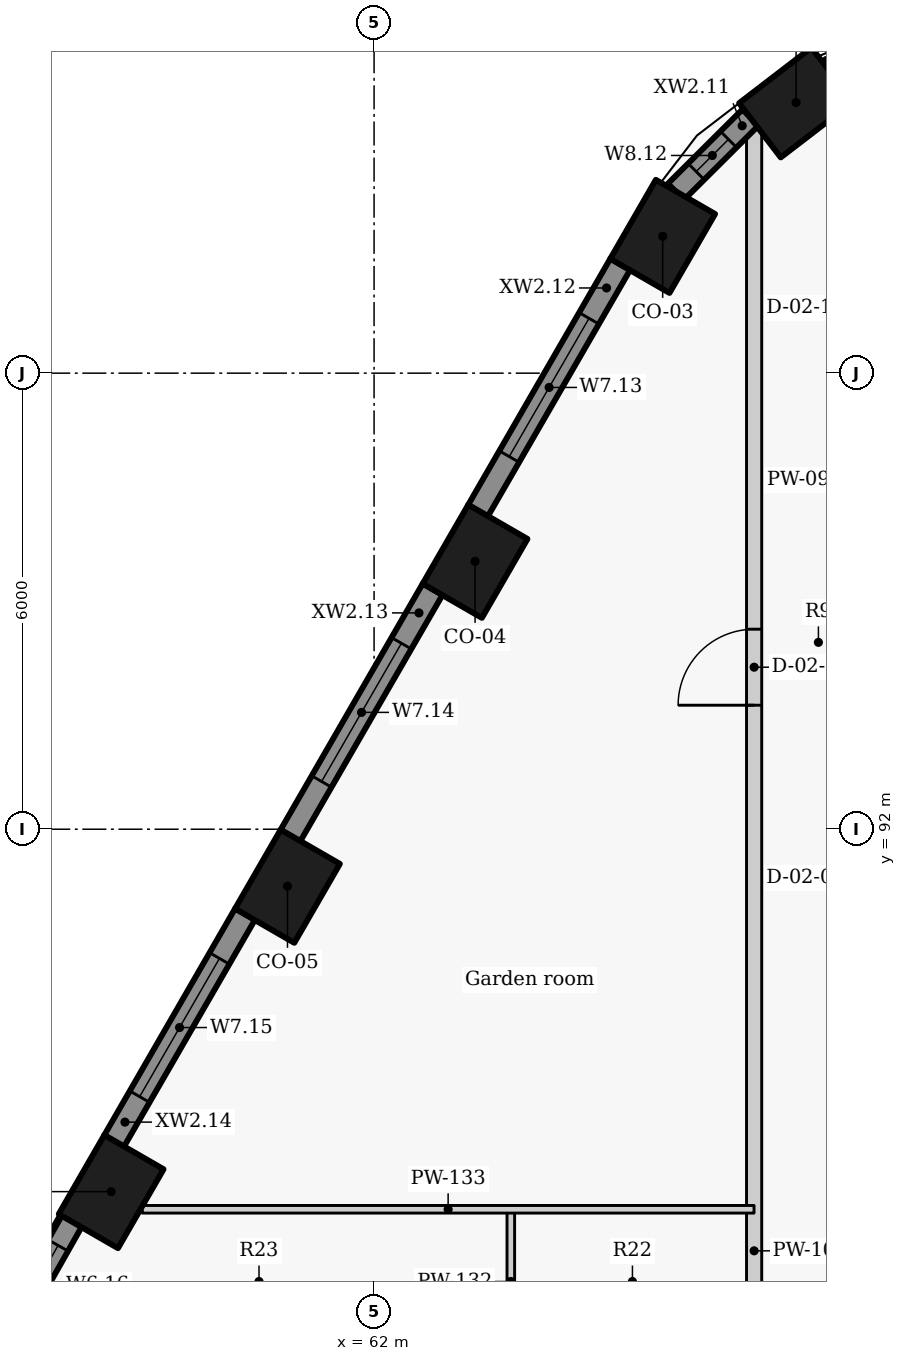
"""IFC4 building model, lengths in metres.
Left out: names, types, materials, properties, quantities, classifications, styles, units other than length and angle.
Written with IfcOpenShell. Run it as: python <this file> out.ifc"""

import sys

from ifc_helpers import new_model, si_unit, direction, frame, frame_2d, origin, origin_2d, place, context, subcontext, project, spatial, rectangle, extrude, element, fill, save


model = new_model("IFC4")
c1 = context("Model", 3, precision=1e-05, world=origin(), true_north=direction((0.0, 1.0)))
c2 = subcontext(c1, "Body", "Model", "MODEL_VIEW")
j1 = project(units=[si_unit("LENGTHUNIT", "METRE"), si_unit("PLANEANGLEUNIT", "RADIAN")], contexts=[c1])
p1 = place(None, origin())
s1 = spatial("IfcSite", under=j1, at=p1, CompositionType="ELEMENT")
p2 = place(p1, origin())
s2 = spatial("IfcBuilding", under=s1, at=p2, CompositionType="ELEMENT")
p3 = place(p2, frame((0.0, 0.0, 213.0)))
s3 = spatial("IfcBuildingStorey", under=s2, at=p3, CompositionType="ELEMENT", Elevation=213.0)
for number, where, z_axis, x_axis in (
    (1, (67.552, 101.56, 0.0), (0.0, 0.0, 1.0), (-0.793, -0.609, 0.0)),
    (2, (65.797, 99.8, 0.0), (0.0, 0.0, 1.0), (-0.5, -0.866, 0.0)),
    (3, (63.329, 95.525, 0.0), (0.0, 0.0, 1.0), (-0.5, -0.866, 0.0)),
    (4, (60.861, 91.25, 0.0), (0.0, 0.0, 1.0), (-0.5, -0.866, 0.0)),
    (5, (58.541, 87.232, 0.0), (0.0, 0.0, 1.0), (-0.5, -0.866, 0.0)),
):
    element("IfcColumn", number, at=place(p3, frame(where, z_axis=z_axis, x_axis=x_axis)), inside=s3, PredefinedType="COLUMN", context=c2, shape_type="SweptSolid", body=[
        extrude(rectangle(XDim=1.2, YDim=0.9, at=origin_2d()), origin(), (0.0, 0.0, 1.0), 3.3),
    ])
p4 = place(p3, frame((69.336, 102.333, 0.0), z_axis=(0.0, 0.0, 1.0), x_axis=(-0.969037396898, -0.246914000036, 0.0)))
e6 = element("IfcWall", 6, at=p4, inside=s3, PredefinedType="SOLIDWALL", context=c2, shape_type="SweptSolid", body=[
    extrude(rectangle(XDim=1.403, YDim=0.3, at=frame_2d((0.702, 0.0))), origin(), (0.0, 0.0, 1.0), 2.425),
])
p5 = place(p4, frame((0.229, 0.0, 0.9)))
e7 = element("IfcOpeningElement", 7, at=p5, cuts=e6, PredefinedType="OPENING", context=c2, shape_type="SweptSolid", body=[
    extrude(rectangle(XDim=0.6, YDim=1.1, at=frame_2d((0.3, 0.55))), frame((0.0, 0.16, 0.0), z_axis=(0.0, -1.0, 0.0), x_axis=(1.0, 0.0, 0.0)), (0.0, 0.0, 1.0), 0.32),
])
p6 = place(p3, frame((66.952, 101.363, 0.0), z_axis=(0.0, 0.0, 1.0), x_axis=(-0.70869320446, -0.705516790695, 0.0)))
e8 = element("IfcWall", 8, at=p6, inside=s3, PredefinedType="SOLIDWALL", context=c2, shape_type="SweptSolid", body=[
    extrude(rectangle(XDim=1.384, YDim=0.3, at=frame_2d((0.692, 0.0))), origin(), (0.0, 0.0, 1.0), 2.425),
])
p7 = place(p6, frame((0.408, 0.0, 0.9)))
e9 = element("IfcOpeningElement", 9, at=p7, cuts=e8, PredefinedType="OPENING", context=c2, shape_type="SweptSolid", body=[
    extrude(rectangle(XDim=0.6, YDim=1.1, at=frame_2d((0.3, 0.55))), frame((0.0, 0.16, 0.0), z_axis=(0.0, -1.0, 0.0), x_axis=(1.0, 0.0, 0.0)), (0.0, 0.0, 1.0), 0.32),
])
p8 = place(p3, frame((65.239, 99.433, 0.0), z_axis=(0.0, 0.0, 1.0), x_axis=(-0.499982088007, -0.866035745032, 0.0)))
e10 = element("IfcWall", 10, at=p8, inside=s3, PredefinedType="SOLIDWALL", context=c2, shape_type="SweptSolid", body=[
    extrude(rectangle(XDim=3.744, YDim=0.3, at=frame_2d((1.872, 0.0))), origin(), (0.0, 0.0, 1.0), 2.425),
])
p9 = place(p8, frame((0.822, 0.0, 0.9)))
e11 = element("IfcOpeningElement", 11, at=p9, cuts=e10, PredefinedType="OPENING", context=c2, shape_type="SweptSolid", body=[
    extrude(rectangle(XDim=2.1, YDim=1.1, at=frame_2d((1.05, 0.55))), frame((0.0, 0.16, 0.0), z_axis=(0.0, -1.0, 0.0), x_axis=(1.0, 0.0, 0.0)), (0.0, 0.0, 1.0), 0.32),
])
p10 = place(p3, frame((62.771, 95.158, 0.0), z_axis=(0.0, 0.0, 1.0), x_axis=(-0.500059225181, -0.86599120741, 0.0)))
e12 = element("IfcWall", 12, at=p10, inside=s3, PredefinedType="SOLIDWALL", context=c2, shape_type="SweptSolid", body=[
    extrude(rectangle(XDim=3.744, YDim=0.3, at=frame_2d((1.872, 0.0))), origin(), (0.0, 0.0, 1.0), 2.425),
])
p11 = place(p10, frame((0.822, 0.0, 0.9)))
e13 = element("IfcOpeningElement", 13, at=p11, cuts=e12, PredefinedType="OPENING", context=c2, shape_type="SweptSolid", body=[
    extrude(rectangle(XDim=2.1, YDim=1.1, at=frame_2d((1.05, 0.55))), frame((0.0, 0.16, 0.0), z_axis=(0.0, -1.0, 0.0), x_axis=(1.0, 0.0, 0.0)), (0.0, 0.0, 1.0), 0.32),
])
p12 = place(p3, frame((60.303, 90.884, 0.0), z_axis=(0.0, 0.0, 1.0), x_axis=(-0.499955427682, -0.866051136095, 0.0)))
e14 = element("IfcWall", 14, at=p12, inside=s3, PredefinedType="SOLIDWALL", context=c2, shape_type="SweptSolid", body=[
    extrude(rectangle(XDim=3.447, YDim=0.3, at=frame_2d((1.724, 0.0))), origin(), (0.0, 0.0, 1.0), 2.425),
])
p13 = place(p12, frame((0.674, 0.0, 0.9)))
e15 = element("IfcOpeningElement", 15, at=p13, cuts=e14, PredefinedType="OPENING", context=c2, shape_type="SweptSolid", body=[
    extrude(rectangle(XDim=2.1, YDim=1.1, at=frame_2d((1.05, 0.55))), frame((0.0, 0.16, 0.0), z_axis=(0.0, -1.0, 0.0), x_axis=(1.0, 0.0, 0.0)), (0.0, 0.0, 1.0), 0.32),
])
p14 = place(p3, frame((58.023, 86.843, 0.0), z_axis=(0.0, 0.0, 1.0), x_axis=(-0.492033360928, -0.870576344575, 0.0)))
e16 = element("IfcWall", 16, at=p14, inside=s3, PredefinedType="SOLIDWALL", context=c2, shape_type="SweptSolid", body=[
    extrude(rectangle(XDim=5.387, YDim=0.3, at=frame_2d((2.693, 0.0))), origin(), (0.0, 0.0, 1.0), 2.425),
])
p15 = place(p14, frame((0.366, 0.0, 0.9)))
e17 = element("IfcOpeningElement", 17, at=p15, cuts=e16, PredefinedType="OPENING", context=c2, shape_type="SweptSolid", body=[
    extrude(rectangle(XDim=1.2, YDim=1.1, at=frame_2d((0.6, 0.55))), frame((0.0, 0.16, 0.0), z_axis=(0.0, -1.0, 0.0), x_axis=(1.0, 0.0, 0.0)), (0.0, 0.0, 1.0), 0.32),
])
p16 = place(p14, frame((2.321, 0.0, 0.9)))
e18 = element("IfcOpeningElement", 18, at=p16, cuts=e16, PredefinedType="OPENING", context=c2, shape_type="SweptSolid", body=[
    extrude(rectangle(XDim=2.1, YDim=1.1, at=frame_2d((1.05, 0.55))), frame((0.0, 0.16, 0.0), z_axis=(0.0, -1.0, 0.0), x_axis=(1.0, 0.0, 0.0)), (0.0, 0.0, 1.0), 0.32),
])
p17 = place(p3, frame((67.0, 58.674, 0.0), z_axis=(0.0, 0.0, 1.0), x_axis=(0.0, 1.0, 0.0)))
e19 = element("IfcWall", 19, at=p17, inside=s3, PredefinedType="PARTITIONING", context=c2, shape_type="SweptSolid", body=[
    extrude(rectangle(XDim=42.592, YDim=0.2, at=frame_2d((21.296, 0.0))), origin(), (0.0, 0.0, 1.0), 2.405),
])
p18 = place(p17, frame((18.026, 0.0, 0.0)))
e20 = element("IfcOpeningElement", 20, at=p18, cuts=e19, PredefinedType="OPENING", context=c2, shape_type="SweptSolid", body=[
    extrude(rectangle(XDim=1.0, YDim=2.1, at=frame_2d((0.5, 1.05))), frame((0.0, 0.11, 0.0), z_axis=(0.0, -1.0, 0.0), x_axis=(1.0, 0.0, 0.0)), (0.0, 0.0, 1.0), 0.22),
])
p19 = place(p17, frame((19.601, 0.0, 0.0)))
e21 = element("IfcOpeningElement", 21, at=p19, cuts=e19, PredefinedType="OPENING", context=c2, shape_type="SweptSolid", body=[
    extrude(rectangle(XDim=1.0, YDim=2.1, at=frame_2d((0.5, 1.05))), frame((0.0, 0.11, 0.0), z_axis=(0.0, -1.0, 0.0), x_axis=(1.0, 0.0, 0.0)), (0.0, 0.0, 1.0), 0.22),
])
p20 = place(p17, frame((4.332, 0.0, 0.0)))
e22 = element("IfcOpeningElement", 22, at=p20, cuts=e19, PredefinedType="OPENING", context=c2, shape_type="SweptSolid", body=[
    extrude(rectangle(XDim=1.0, YDim=2.1, at=frame_2d((0.5, 1.05))), frame((0.0, 0.11, 0.0), z_axis=(0.0, -1.0, 0.0), x_axis=(1.0, 0.0, 0.0)), (0.0, 0.0, 1.0), 0.22),
])
p21 = place(p17, frame((34.957, 0.0, 0.0)))
e23 = element("IfcOpeningElement", 23, at=p21, cuts=e19, PredefinedType="OPENING", context=c2, shape_type="SweptSolid", body=[
    extrude(rectangle(XDim=1.0, YDim=2.1, at=frame_2d((0.5, 1.05))), frame((0.0, 0.11, 0.0), z_axis=(0.0, -1.0, 0.0), x_axis=(1.0, 0.0, 0.0)), (0.0, 0.0, 1.0), 0.22),
])
p22 = place(p3, frame((63.799, 85.1, 0.0), z_axis=(0.0, 0.0, 1.0), x_axis=(0.0, 1.0, 0.0)))
e24 = element("IfcWall", 24, at=p22, inside=s3, PredefinedType="PARTITIONING", context=c2, shape_type="SweptSolid", body=[
    extrude(rectangle(XDim=1.9, YDim=0.1, at=frame_2d((0.95, 0.0))), origin(), (0.0, 0.0, 1.0), 3.025),
])
p23 = place(p3, frame((58.95, 87.0, 0.0), z_axis=(0.0, 0.0, 1.0), x_axis=(1.0, 0.0, 0.0)))
e25 = element("IfcWall", 25, at=p23, inside=s3, PredefinedType="PARTITIONING", context=c2, shape_type="SweptSolid", body=[
    extrude(rectangle(XDim=8.049, YDim=0.1, at=frame_2d((4.025, 0.0))), origin(), (0.0, 0.0, 1.0), 3.025),
])
p24 = place(p7, origin())
e26 = element("IfcWindow", 26, at=p24, inside=s3, PartitioningType="SINGLE_PANEL", PredefinedType="WINDOW", context=c2, shape_type="SweptSolid", body=[
    extrude(rectangle(XDim=0.6, YDim=1.1, at=frame_2d((0.3, 0.55))), frame((0.0, 0.03, 0.0), z_axis=(0.0, -1.0, 0.0), x_axis=(1.0, 0.0, 0.0)), (0.0, 0.0, 1.0), 0.06),
])
fill(e9, e26)
p25 = place(p9, origin())
e27 = element("IfcWindow", 27, at=p25, inside=s3, PartitioningType="SINGLE_PANEL", PredefinedType="WINDOW", context=c2, shape_type="SweptSolid", body=[
    extrude(rectangle(XDim=2.1, YDim=1.1, at=frame_2d((1.05, 0.55))), frame((0.0, 0.03, 0.0), z_axis=(0.0, -1.0, 0.0), x_axis=(1.0, 0.0, 0.0)), (0.0, 0.0, 1.0), 0.06),
])
fill(e11, e27)
p26 = place(p11, origin())
e28 = element("IfcWindow", 28, at=p26, inside=s3, PartitioningType="SINGLE_PANEL", PredefinedType="WINDOW", context=c2, shape_type="SweptSolid", body=[
    extrude(rectangle(XDim=2.1, YDim=1.1, at=frame_2d((1.05, 0.55))), frame((0.0, 0.03, 0.0), z_axis=(0.0, -1.0, 0.0), x_axis=(1.0, 0.0, 0.0)), (0.0, 0.0, 1.0), 0.06),
])
fill(e13, e28)
p27 = place(p13, origin())
e29 = element("IfcWindow", 29, at=p27, inside=s3, PartitioningType="SINGLE_PANEL", PredefinedType="WINDOW", context=c2, shape_type="SweptSolid", body=[
    extrude(rectangle(XDim=2.1, YDim=1.1, at=frame_2d((1.05, 0.55))), frame((0.0, 0.03, 0.0), z_axis=(0.0, -1.0, 0.0), x_axis=(1.0, 0.0, 0.0)), (0.0, 0.0, 1.0), 0.06),
])
fill(e15, e29)
p28 = place(p15, origin())
e30 = element("IfcWindow", 30, at=p28, inside=s3, PartitioningType="SINGLE_PANEL", PredefinedType="WINDOW", context=c2, shape_type="SweptSolid", body=[
    extrude(rectangle(XDim=1.2, YDim=1.1, at=frame_2d((0.6, 0.55))), frame((0.0, 0.03, 0.0), z_axis=(0.0, -1.0, 0.0), x_axis=(1.0, 0.0, 0.0)), (0.0, 0.0, 1.0), 0.06),
])
fill(e17, e30)
p29 = place(p21, origin())
e31 = element("IfcDoor", 31, at=p29, inside=s3, OperationType="SINGLE_SWING_LEFT", PredefinedType="DOOR", context=c2, shape_type="SweptSolid", body=[
    extrude(rectangle(XDim=1.0, YDim=2.1, at=frame_2d((0.5, 1.05))), frame((0.0, 0.025, 0.0), z_axis=(0.0, -1.0, 0.0), x_axis=(1.0, 0.0, 0.0)), (0.0, 0.0, 1.0), 0.05),
])
fill(e23, e31)
save(model, sys.argv[1])
